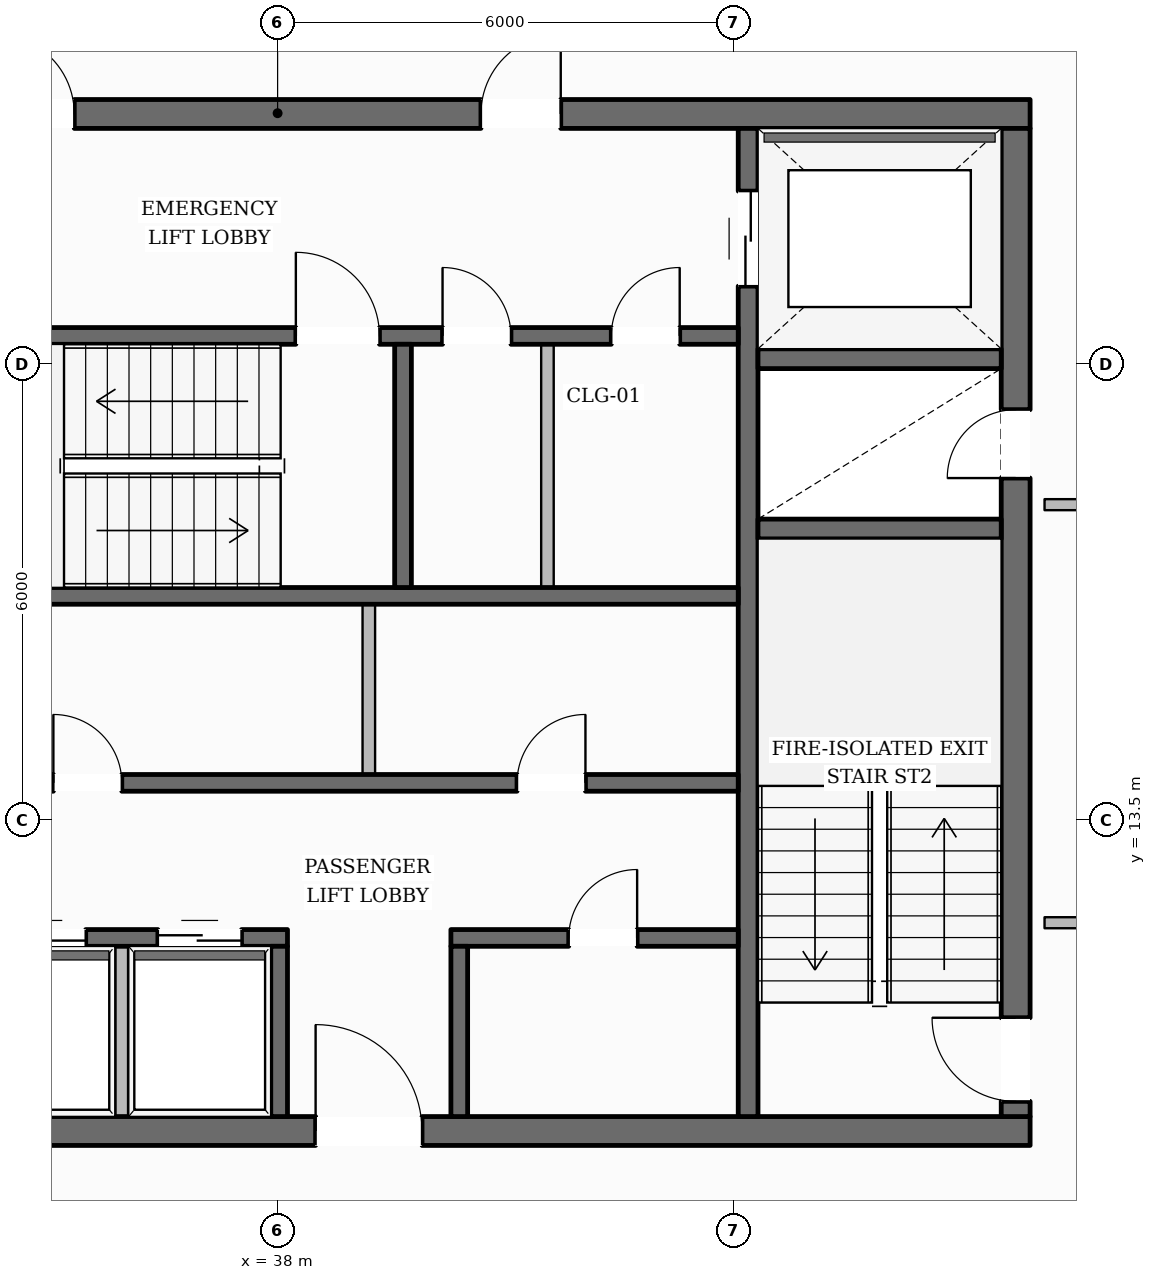
"""IFC4 building model, lengths in metres.
Left out: names, types, materials, properties, quantities, classifications, styles, units other than length and angle.
Written with IfcOpenShell. Run it as: python <this file> out.ifc"""

import sys

from ifc_helpers import new_model, si_unit, direction, frame, frame_2d, origin, place, context, subcontext, project, spatial, rectangle, extrude, element, fill, save


model = new_model("IFC4")
c1 = context("Model", 3, precision=1e-05, world=origin(), true_north=direction((0.0, 1.0)))
c2 = subcontext(c1, "Body", "Model", "MODEL_VIEW")
j1 = project(units=[si_unit("LENGTHUNIT", "METRE"), si_unit("PLANEANGLEUNIT", "RADIAN")], contexts=[c1])
p1 = place(None, origin())
s1 = spatial("IfcSite", under=j1, at=p1, CompositionType="ELEMENT")
p2 = place(p1, origin())
s2 = spatial("IfcBuilding", under=s1, at=p2, CompositionType="ELEMENT")
p3 = place(p2, frame((0.0, 0.0, 270.3)))
s3 = spatial("IfcBuildingStorey", under=s2, at=p3, CompositionType="ELEMENT", Elevation=270.3)
p4 = place(p3, frame((28.1, 9.41, 0.0), z_axis=(0.0, 0.0, 1.0), x_axis=(1.0, 0.0, 0.0)))
e1 = element("IfcWall", 1, at=p4, inside=s3, PredefinedType="SOLIDWALL", context=c2, shape_type="SweptSolid", body=[
    extrude(rectangle(XDim=19.8, YDim=0.38, at=frame_2d((9.9, 0.0))), origin(), (0.0, 0.0, 1.0), 3.61),
])
p5 = place(p4, frame((10.4, 0.0, 0.0)))
e2 = element("IfcOpeningElement", 2, at=p5, cuts=e1, PredefinedType="OPENING", context=c2, shape_type="SweptSolid", body=[
    extrude(rectangle(XDim=1.4, YDim=2.2, at=frame_2d((0.7, 1.1))), frame((0.0, 0.2, 0.0), z_axis=(0.0, -1.0, 0.0), x_axis=(1.0, 0.0, 0.0)), (0.0, 0.0, 1.0), 0.4),
])
p6 = place(p3, frame((28.1, 22.79, 0.0), z_axis=(0.0, 0.0, 1.0), x_axis=(1.0, 0.0, 0.0)))
e3 = element("IfcWall", 3, at=p6, inside=s3, PredefinedType="SOLIDWALL", context=c2, shape_type="SweptSolid", body=[
    extrude(rectangle(XDim=19.8, YDim=0.38, at=frame_2d((9.9, 0.0))), origin(), (0.0, 0.0, 1.0), 3.61),
])
p7 = place(p6, frame((6.175, 0.0, 0.0)))
e4 = element("IfcOpeningElement", 4, at=p7, cuts=e3, PredefinedType="OPENING", context=c2, shape_type="SweptSolid", body=[
    extrude(rectangle(XDim=1.05, YDim=2.15, at=frame_2d((0.525, 1.075))), frame((0.0, 0.2, 0.0), z_axis=(0.0, -1.0, 0.0), x_axis=(1.0, 0.0, 0.0)), (0.0, 0.0, 1.0), 0.4),
])
p8 = place(p6, frame((12.575, 0.0, 0.0)))
e5 = element("IfcOpeningElement", 5, at=p8, cuts=e3, PredefinedType="OPENING", context=c2, shape_type="SweptSolid", body=[
    extrude(rectangle(XDim=1.05, YDim=2.15, at=frame_2d((0.525, 1.075))), frame((0.0, 0.2, 0.0), z_axis=(0.0, -1.0, 0.0), x_axis=(1.0, 0.0, 0.0)), (0.0, 0.0, 1.0), 0.4),
])
p9 = place(p3, frame((47.71, 9.6, 0.0), z_axis=(0.0, 0.0, 1.0), x_axis=(0.0, 1.0, 0.0)))
e6 = element("IfcWall", 6, at=p9, inside=s3, PredefinedType="SOLIDWALL", context=c2, shape_type="SweptSolid", body=[
    extrude(rectangle(XDim=13.0, YDim=0.38, at=frame_2d((6.5, 0.0))), origin(), (0.0, 0.0, 1.0), 3.61),
])
p10 = place(p9, frame((0.2, 0.0, 0.0)))
e7 = element("IfcOpeningElement", 7, at=p10, cuts=e6, PredefinedType="OPENING", context=c2, shape_type="SweptSolid", body=[
    extrude(rectangle(XDim=1.1, YDim=2.15, at=frame_2d((0.55, 1.075))), frame((0.0, 0.2, 0.0), z_axis=(0.0, -1.0, 0.0), x_axis=(1.0, 0.0, 0.0)), (0.0, 0.0, 1.0), 0.4),
])
p11 = place(p9, frame((8.4, 0.0, 0.0)))
e8 = element("IfcOpeningElement", 8, at=p11, cuts=e6, PredefinedType="OPENING", context=c2, shape_type="SweptSolid", body=[
    extrude(rectangle(XDim=0.9, YDim=2.1, at=frame_2d((0.45, 1.05))), frame((0.0, 0.2, 0.0), z_axis=(0.0, -1.0, 0.0), x_axis=(1.0, 0.0, 0.0)), (0.0, 0.0, 1.0), 0.4),
])
p12 = place(p3, frame((44.19, 9.6, 0.0), z_axis=(0.0, 0.0, 1.0), x_axis=(0.0, 1.0, 0.0)))
e9 = element("IfcWall", 9, at=p12, inside=s3, PredefinedType="SHEAR", context=c2, shape_type="SweptSolid", body=[
    extrude(rectangle(XDim=13.0, YDim=0.26, at=frame_2d((6.5, 0.0))), origin(), (0.0, 0.0, 1.0), 3.61),
])
p13 = place(p12, frame((10.925, 0.0, 0.0)))
e10 = element("IfcOpeningElement", 10, at=p13, cuts=e9, PredefinedType="OPENING", context=c2, shape_type="SweptSolid", body=[
    extrude(rectangle(XDim=1.25, YDim=2.25, at=frame_2d((0.625, 1.125))), frame((0.0, 0.14, 0.0), z_axis=(0.0, -1.0, 0.0), x_axis=(1.0, 0.0, 0.0)), (0.0, 0.0, 1.0), 0.28),
])
for number, where, z_axis, x_axis in (
    (11, (44.32, 17.33, 0.0), (0.0, 0.0, 1.0), (1.0, 0.0, 0.0)),
    (12, (44.32, 19.57, 0.0), (0.0, 0.0, 1.0), (1.0, 0.0, 0.0)),
):
    element("IfcWall", number, at=place(p3, frame(where, z_axis=z_axis, x_axis=x_axis)), inside=s3, PredefinedType="SHEAR", context=c2, shape_type="SweptSolid", body=[
        extrude(rectangle(XDim=3.2, YDim=0.26, at=frame_2d((1.6, 0.0))), origin(), (0.0, 0.0, 1.0), 3.61),
    ])
p14 = place(p3, frame((31.94, 19.87, 0.0), z_axis=(0.0, 0.0, 1.0), x_axis=(1.0, 0.0, 0.0)))
e13 = element("IfcWall", 13, at=p14, inside=s3, PredefinedType="SOLIDWALL", context=c2, shape_type="SweptSolid", body=[
    extrude(rectangle(XDim=12.12, YDim=0.22, at=frame_2d((6.06, 0.0))), origin(), (0.0, 0.0, 1.0), 3.61),
])
p15 = place(p14, frame((6.3, 0.0, 0.0)))
e14 = element("IfcOpeningElement", 14, at=p15, cuts=e13, PredefinedType="OPENING", context=c2, shape_type="SweptSolid", body=[
    extrude(rectangle(XDim=1.1, YDim=2.15, at=frame_2d((0.55, 1.075))), frame((0.0, 0.12, 0.0), z_axis=(0.0, -1.0, 0.0), x_axis=(1.0, 0.0, 0.0)), (0.0, 0.0, 1.0), 0.24),
])
p16 = place(p14, frame((8.23, 0.0, 0.0)))
e15 = element("IfcOpeningElement", 15, at=p16, cuts=e13, PredefinedType="OPENING", context=c2, shape_type="SweptSolid", body=[
    extrude(rectangle(XDim=0.9, YDim=2.1, at=frame_2d((0.45, 1.05))), frame((0.0, 0.12, 0.0), z_axis=(0.0, -1.0, 0.0), x_axis=(1.0, 0.0, 0.0)), (0.0, 0.0, 1.0), 0.24),
])
p17 = place(p14, frame((10.45, 0.0, 0.0)))
e16 = element("IfcOpeningElement", 16, at=p17, cuts=e13, PredefinedType="OPENING", context=c2, shape_type="SweptSolid", body=[
    extrude(rectangle(XDim=0.9, YDim=2.1, at=frame_2d((0.45, 1.05))), frame((0.0, 0.12, 0.0), z_axis=(0.0, -1.0, 0.0), x_axis=(1.0, 0.0, 0.0)), (0.0, 0.0, 1.0), 0.24),
])
p18 = place(p3, frame((31.94, 16.45, 0.0), z_axis=(0.0, 0.0, 1.0), x_axis=(1.0, 0.0, 0.0)))
e17 = element("IfcWall", 17, at=p18, inside=s3, PredefinedType="SOLIDWALL", context=c2, shape_type="SweptSolid", body=[
    extrude(rectangle(XDim=12.12, YDim=0.22, at=frame_2d((6.06, 0.0))), origin(), (0.0, 0.0, 1.0), 3.61),
])
p19 = place(p3, frame((39.65, 16.56, 0.0), z_axis=(0.0, 0.0, 1.0), x_axis=(0.0, 1.0, 0.0)))
e18 = element("IfcWall", 18, at=p19, inside=s3, PredefinedType="SOLIDWALL", context=c2, shape_type="SweptSolid", body=[
    extrude(rectangle(XDim=3.2, YDim=0.22, at=frame_2d((1.6, 0.0))), origin(), (0.0, 0.0, 1.0), 3.61),
])
p20 = place(p3, frame((31.94, 13.99, 0.0), z_axis=(0.0, 0.0, 1.0), x_axis=(1.0, 0.0, 0.0)))
e19 = element("IfcWall", 19, at=p20, inside=s3, PredefinedType="SOLIDWALL", context=c2, shape_type="SweptSolid", body=[
    extrude(rectangle(XDim=12.12, YDim=0.22, at=frame_2d((6.06, 0.0))), origin(), (0.0, 0.0, 1.0), 3.61),
])
p21 = place(p20, frame((3.11, 0.0, 0.0)))
e20 = element("IfcOpeningElement", 20, at=p21, cuts=e19, PredefinedType="OPENING", context=c2, shape_type="SweptSolid", body=[
    extrude(rectangle(XDim=0.9, YDim=2.1, at=frame_2d((0.45, 1.05))), frame((0.0, 0.12, 0.0), z_axis=(0.0, -1.0, 0.0), x_axis=(1.0, 0.0, 0.0)), (0.0, 0.0, 1.0), 0.24),
])
p22 = place(p20, frame((9.21, 0.0, 0.0)))
e21 = element("IfcOpeningElement", 21, at=p22, cuts=e19, PredefinedType="OPENING", context=c2, shape_type="SweptSolid", body=[
    extrude(rectangle(XDim=0.9, YDim=2.1, at=frame_2d((0.45, 1.05))), frame((0.0, 0.12, 0.0), z_axis=(0.0, -1.0, 0.0), x_axis=(1.0, 0.0, 0.0)), (0.0, 0.0, 1.0), 0.24),
])
p23 = place(p3, frame((31.94, 11.95, 0.0), z_axis=(0.0, 0.0, 1.0), x_axis=(1.0, 0.0, 0.0)))
e22 = element("IfcWall", 22, at=p23, inside=s3, PredefinedType="SOLIDWALL", context=c2, shape_type="SweptSolid", body=[
    extrude(rectangle(XDim=6.19, YDim=0.22, at=frame_2d((3.095, 0.0))), origin(), (0.0, 0.0, 1.0), 3.61),
])
p24 = place(p23, frame((0.385, 0.0, 0.0)))
e23 = element("IfcOpeningElement", 23, at=p24, cuts=e22, PredefinedType="OPENING", context=c2, shape_type="SweptSolid", body=[
    extrude(rectangle(XDim=1.1, YDim=2.2, at=frame_2d((0.55, 1.1))), frame((0.0, 0.12, 0.0), z_axis=(0.0, -1.0, 0.0), x_axis=(1.0, 0.0, 0.0)), (0.0, 0.0, 1.0), 0.24),
])
p25 = place(p23, frame((2.435, 0.0, 0.0)))
e24 = element("IfcOpeningElement", 24, at=p25, cuts=e22, PredefinedType="OPENING", context=c2, shape_type="SweptSolid", body=[
    extrude(rectangle(XDim=1.1, YDim=2.2, at=frame_2d((0.55, 1.1))), frame((0.0, 0.12, 0.0), z_axis=(0.0, -1.0, 0.0), x_axis=(1.0, 0.0, 0.0)), (0.0, 0.0, 1.0), 0.24),
])
p26 = place(p23, frame((4.485, 0.0, 0.0)))
e25 = element("IfcOpeningElement", 25, at=p26, cuts=e22, PredefinedType="OPENING", context=c2, shape_type="SweptSolid", body=[
    extrude(rectangle(XDim=1.1, YDim=2.2, at=frame_2d((0.55, 1.1))), frame((0.0, 0.12, 0.0), z_axis=(0.0, -1.0, 0.0), x_axis=(1.0, 0.0, 0.0)), (0.0, 0.0, 1.0), 0.24),
])
p27 = place(p3, frame((40.28, 11.95, 0.0), z_axis=(0.0, 0.0, 1.0), x_axis=(1.0, 0.0, 0.0)))
e26 = element("IfcWall", 26, at=p27, inside=s3, PredefinedType="SOLIDWALL", context=c2, shape_type="SweptSolid", body=[
    extrude(rectangle(XDim=3.78, YDim=0.22, at=frame_2d((1.89, 0.0))), origin(), (0.0, 0.0, 1.0), 3.61),
])
p28 = place(p27, frame((1.55, 0.0, 0.0)))
e27 = element("IfcOpeningElement", 27, at=p28, cuts=e26, PredefinedType="OPENING", context=c2, shape_type="SweptSolid", body=[
    extrude(rectangle(XDim=0.9, YDim=2.1, at=frame_2d((0.45, 1.05))), frame((0.0, 0.12, 0.0), z_axis=(0.0, -1.0, 0.0), x_axis=(1.0, 0.0, 0.0)), (0.0, 0.0, 1.0), 0.24),
])
for number, where, z_axis, x_axis in (
    (28, (38.02, 9.6, 0.0), (0.0, 0.0, 1.0), (0.0, 1.0, 0.0)),
    (29, (40.39, 9.6, 0.0), (0.0, 0.0, 1.0), (0.0, 1.0, 0.0)),
):
    element("IfcWall", number, at=place(p3, frame(where, z_axis=z_axis, x_axis=x_axis)), inside=s3, PredefinedType="SOLIDWALL", context=c2, shape_type="SweptSolid", body=[
        extrude(rectangle(XDim=2.24, YDim=0.22, at=frame_2d((1.12, 0.0))), origin(), (0.0, 0.0, 1.0), 3.61),
    ])
p29 = place(p3, frame((15.686, 10.536, 0.0), z_axis=(0.0, 0.0, 1.0), x_axis=(0.506100645038, 0.862474426921, 0.0)))
e30 = element("IfcWall", 30, at=p29, inside=s3, PredefinedType="STANDARD", context=c2, shape_type="SweptSolid", body=[
    extrude(rectangle(XDim=38.084, YDim=0.35, at=frame_2d((19.042, 0.0))), origin(), (0.0, 0.0, 1.0), 3.196),
])
p30 = place(p29, frame((27.963, 0.0, 0.0)))
e31 = element("IfcOpeningElement", 31, at=p30, cuts=e30, PredefinedType="OPENING", context=c2, shape_type="SweptSolid", body=[
    extrude(rectangle(XDim=1.0, YDim=2.2, at=frame_2d((0.5, 1.1))), frame((0.0, 0.185, 0.0), z_axis=(0.0, -1.0, 0.0), x_axis=(1.0, 0.0, 0.0)), (0.0, 0.0, 1.0), 0.37),
])
p31 = place(p29, frame((33.839, 0.0, 0.65)))
e32 = element("IfcOpeningElement", 32, at=p31, cuts=e30, PredefinedType="OPENING", context=c2, shape_type="SweptSolid", body=[
    extrude(rectangle(XDim=1.35, YDim=1.75, at=frame_2d((0.675, 0.875))), frame((0.0, 0.185, 0.0), z_axis=(0.0, -1.0, 0.0), x_axis=(1.0, 0.0, 0.0)), (0.0, 0.0, 1.0), 0.37),
])
p32 = place(p29, frame((21.464, 0.0, 0.65)))
e33 = element("IfcOpeningElement", 33, at=p32, cuts=e30, PredefinedType="OPENING", context=c2, shape_type="SweptSolid", body=[
    extrude(rectangle(XDim=1.35, YDim=1.75, at=frame_2d((0.675, 0.875))), frame((0.0, 0.185, 0.0), z_axis=(0.0, -1.0, 0.0), x_axis=(1.0, 0.0, 0.0)), (0.0, 0.0, 1.0), 0.37),
])
p33 = place(p29, frame((9.089, 0.0, 0.65)))
e34 = element("IfcOpeningElement", 34, at=p33, cuts=e30, PredefinedType="OPENING", context=c2, shape_type="SweptSolid", body=[
    extrude(rectangle(XDim=1.35, YDim=1.75, at=frame_2d((0.675, 0.875))), frame((0.0, 0.185, 0.0), z_axis=(0.0, -1.0, 0.0), x_axis=(1.0, 0.0, 0.0)), (0.0, 0.0, 1.0), 0.37),
])
p34 = place(p29, frame((2.902, 0.0, 0.65)))
e35 = element("IfcOpeningElement", 35, at=p34, cuts=e30, PredefinedType="OPENING", context=c2, shape_type="SweptSolid", body=[
    extrude(rectangle(XDim=1.35, YDim=1.75, at=frame_2d((0.675, 0.875))), frame((0.0, 0.185, 0.0), z_axis=(0.0, -1.0, 0.0), x_axis=(1.0, 0.0, 0.0)), (0.0, 0.0, 1.0), 0.37),
])
p35 = place(p3, frame((41.09, 43.352, 0.0), z_axis=(0.0, 0.0, 1.0), x_axis=(0.509850521087, -0.860263009868, 0.0)))
e36 = element("IfcWall", 36, at=p35, inside=s3, PredefinedType="STANDARD", context=c2, shape_type="SweptSolid", body=[
    extrude(rectangle(XDim=38.375, YDim=0.35, at=frame_2d((19.188, 0.0))), origin(), (0.0, 0.0, 1.0), 3.196),
])
p36 = place(p35, frame((28.181, 0.0, 0.0)))
e37 = element("IfcOpeningElement", 37, at=p36, cuts=e36, PredefinedType="OPENING", context=c2, shape_type="SweptSolid", body=[
    extrude(rectangle(XDim=1.0, YDim=2.2, at=frame_2d((0.5, 1.1))), frame((0.0, 0.185, 0.0), z_axis=(0.0, -1.0, 0.0), x_axis=(1.0, 0.0, 0.0)), (0.0, 0.0, 1.0), 0.37),
])
p37 = place(p35, frame((34.098, 0.0, 0.65)))
e38 = element("IfcOpeningElement", 38, at=p37, cuts=e36, PredefinedType="OPENING", context=c2, shape_type="SweptSolid", body=[
    extrude(rectangle(XDim=1.35, YDim=1.75, at=frame_2d((0.675, 0.875))), frame((0.0, 0.185, 0.0), z_axis=(0.0, -1.0, 0.0), x_axis=(1.0, 0.0, 0.0)), (0.0, 0.0, 1.0), 0.37),
])
p38 = place(p35, frame((21.625, 0.0, 0.65)))
e39 = element("IfcOpeningElement", 39, at=p38, cuts=e36, PredefinedType="OPENING", context=c2, shape_type="SweptSolid", body=[
    extrude(rectangle(XDim=1.35, YDim=1.75, at=frame_2d((0.675, 0.875))), frame((0.0, 0.185, 0.0), z_axis=(0.0, -1.0, 0.0), x_axis=(1.0, 0.0, 0.0)), (0.0, 0.0, 1.0), 0.37),
])
p39 = place(p35, frame((9.152, 0.0, 0.65)))
e40 = element("IfcOpeningElement", 40, at=p39, cuts=e36, PredefinedType="OPENING", context=c2, shape_type="SweptSolid", body=[
    extrude(rectangle(XDim=1.35, YDim=1.75, at=frame_2d((0.675, 0.875))), frame((0.0, 0.185, 0.0), z_axis=(0.0, -1.0, 0.0), x_axis=(1.0, 0.0, 0.0)), (0.0, 0.0, 1.0), 0.37),
])
p40 = place(p35, frame((2.915, 0.0, 0.65)))
e41 = element("IfcOpeningElement", 41, at=p40, cuts=e36, PredefinedType="OPENING", context=c2, shape_type="SweptSolid", body=[
    extrude(rectangle(XDim=1.35, YDim=1.75, at=frame_2d((0.675, 0.875))), frame((0.0, 0.185, 0.0), z_axis=(0.0, -1.0, 0.0), x_axis=(1.0, 0.0, 0.0)), (0.0, 0.0, 1.0), 0.37),
])
p41 = place(p3, frame((35.95, 9.49, 0.0), z_axis=(0.0, 0.0, 1.0), x_axis=(0.0, 1.0, 0.0)))
e42 = element("IfcWall", 42, at=p41, inside=s3, PredefinedType="PARTITIONING", context=c2, shape_type="SweptSolid", body=[
    extrude(rectangle(XDim=2.35, YDim=0.165, at=frame_2d((1.175, 0.0))), origin(), (0.0, 0.0, 1.0), 3.61),
])
p42 = place(p3, frame((39.2, 14.1, 0.0), z_axis=(0.0, 0.0, 1.0), x_axis=(0.0, 1.0, 0.0)))
e43 = element("IfcWall", 43, at=p42, inside=s3, PredefinedType="PARTITIONING", context=c2, shape_type="SweptSolid", body=[
    extrude(rectangle(XDim=2.24, YDim=0.165, at=frame_2d((1.12, 0.0))), origin(), (0.0, 0.0, 1.0), 3.61),
])
p43 = place(p3, frame((41.55, 16.56, 0.0), z_axis=(0.0, 0.0, 1.0), x_axis=(0.0, 1.0, 0.0)))
e44 = element("IfcWall", 44, at=p43, inside=s3, PredefinedType="PARTITIONING", context=c2, shape_type="SweptSolid", body=[
    extrude(rectangle(XDim=3.2, YDim=0.165, at=frame_2d((1.6, 0.0))), origin(), (0.0, 0.0, 1.0), 3.61),
])
for number, where, z_axis, x_axis in (
    (45, (49.91, 17.65, 0.0), (0.0, 0.0, 1.0), (-1.0, 0.0, 0.0)),
    (46, (48.09, 12.15, 0.0), (0.0, 0.0, 1.0), (1.0, 0.0, 0.0)),
):
    element("IfcWall", number, at=place(p3, frame(where, z_axis=z_axis, x_axis=x_axis)), inside=s3, PredefinedType="PARTITIONING", context=c2, shape_type="SweptSolid", body=[
        extrude(rectangle(XDim=1.82, YDim=0.145, at=frame_2d((0.91, 0.0))), origin(), (0.0, 0.0, 1.0), 3.61),
    ])
p44 = place(p10, origin())
e47 = element("IfcDoor", 47, at=p44, inside=s3, OperationType="SINGLE_SWING_RIGHT", PredefinedType="DOOR", context=c2, shape_type="SweptSolid", body=[
    extrude(rectangle(XDim=1.1, YDim=2.15, at=frame_2d((0.55, 1.075))), frame((0.0, 0.025, 0.0), z_axis=(0.0, -1.0, 0.0), x_axis=(1.0, 0.0, 0.0)), (0.0, 0.0, 1.0), 0.05),
])
fill(e7, e47)
p45 = place(p15, origin())
e48 = element("IfcDoor", 48, at=p45, inside=s3, OperationType="SINGLE_SWING_LEFT", PredefinedType="DOOR", context=c2, shape_type="SweptSolid", body=[
    extrude(rectangle(XDim=1.1, YDim=2.15, at=frame_2d((0.55, 1.075))), frame((0.0, 0.025, 0.0), z_axis=(0.0, -1.0, 0.0), x_axis=(1.0, 0.0, 0.0)), (0.0, 0.0, 1.0), 0.05),
])
fill(e14, e48)
p46 = place(p11, origin())
e49 = element("IfcDoor", 49, at=p46, inside=s3, OperationType="SINGLE_SWING_LEFT", PredefinedType="DOOR", context=c2, shape_type="SweptSolid", body=[
    extrude(rectangle(XDim=0.9, YDim=2.1, at=frame_2d((0.45, 1.05))), frame((0.0, 0.025, 0.0), z_axis=(0.0, -1.0, 0.0), x_axis=(1.0, 0.0, 0.0)), (0.0, 0.0, 1.0), 0.05),
])
fill(e8, e49)
p47 = place(p7, origin())
e50 = element("IfcDoor", 50, at=p47, inside=s3, OperationType="SINGLE_SWING_LEFT", PredefinedType="DOOR", context=c2, shape_type="SweptSolid", body=[
    extrude(rectangle(XDim=1.05, YDim=2.15, at=frame_2d((0.525, 1.075))), frame((0.0, 0.025, 0.0), z_axis=(0.0, -1.0, 0.0), x_axis=(1.0, 0.0, 0.0)), (0.0, 0.0, 1.0), 0.05),
])
fill(e4, e50)
p48 = place(p8, origin())
e51 = element("IfcDoor", 51, at=p48, inside=s3, OperationType="SINGLE_SWING_RIGHT", PredefinedType="DOOR", context=c2, shape_type="SweptSolid", body=[
    extrude(rectangle(XDim=1.05, YDim=2.15, at=frame_2d((0.525, 1.075))), frame((0.0, 0.025, 0.0), z_axis=(0.0, -1.0, 0.0), x_axis=(1.0, 0.0, 0.0)), (0.0, 0.0, 1.0), 0.05),
])
fill(e5, e51)
p49 = place(p13, origin())
e52 = element("IfcDoor", 52, at=p49, inside=s3, OperationType="DOUBLE_DOOR_SLIDING", PredefinedType="DOOR", context=c2, shape_type="SweptSolid", body=[
    extrude(rectangle(XDim=1.25, YDim=2.25, at=frame_2d((0.625, 1.125))), frame((0.0, 0.025, 0.0), z_axis=(0.0, -1.0, 0.0), x_axis=(1.0, 0.0, 0.0)), (0.0, 0.0, 1.0), 0.05),
])
fill(e10, e52)
p50 = place(p5, origin())
e53 = element("IfcDoor", 53, at=p50, inside=s3, OperationType="SINGLE_SWING_LEFT", PredefinedType="DOOR", context=c2, shape_type="SweptSolid", body=[
    extrude(rectangle(XDim=1.4, YDim=2.2, at=frame_2d((0.7, 1.1))), frame((0.0, 0.025, 0.0), z_axis=(0.0, -1.0, 0.0), x_axis=(1.0, 0.0, 0.0)), (0.0, 0.0, 1.0), 0.05),
])
fill(e2, e53)
p51 = place(p25, origin())
e54 = element("IfcDoor", 54, at=p51, inside=s3, OperationType="DOUBLE_DOOR_SLIDING", PredefinedType="DOOR", context=c2, shape_type="SweptSolid", body=[
    extrude(rectangle(XDim=1.1, YDim=2.2, at=frame_2d((0.55, 1.1))), frame((0.0, 0.025, 0.0), z_axis=(0.0, -1.0, 0.0), x_axis=(1.0, 0.0, 0.0)), (0.0, 0.0, 1.0), 0.05),
])
fill(e24, e54)
p52 = place(p26, origin())
e55 = element("IfcDoor", 55, at=p52, inside=s3, OperationType="DOUBLE_DOOR_SLIDING", PredefinedType="DOOR", context=c2, shape_type="SweptSolid", body=[
    extrude(rectangle(XDim=1.1, YDim=2.2, at=frame_2d((0.55, 1.1))), frame((0.0, 0.025, 0.0), z_axis=(0.0, -1.0, 0.0), x_axis=(1.0, 0.0, 0.0)), (0.0, 0.0, 1.0), 0.05),
])
fill(e25, e55)
p53 = place(p21, origin())
e56 = element("IfcDoor", 56, at=p53, inside=s3, OperationType="SINGLE_SWING_LEFT", PredefinedType="DOOR", context=c2, shape_type="SweptSolid", body=[
    extrude(rectangle(XDim=0.9, YDim=2.1, at=frame_2d((0.45, 1.05))), frame((0.0, 0.025, 0.0), z_axis=(0.0, -1.0, 0.0), x_axis=(1.0, 0.0, 0.0)), (0.0, 0.0, 1.0), 0.05),
])
fill(e20, e56)
p54 = place(p22, origin())
e57 = element("IfcDoor", 57, at=p54, inside=s3, OperationType="SINGLE_SWING_RIGHT", PredefinedType="DOOR", context=c2, shape_type="SweptSolid", body=[
    extrude(rectangle(XDim=0.9, YDim=2.1, at=frame_2d((0.45, 1.05))), frame((0.0, 0.025, 0.0), z_axis=(0.0, -1.0, 0.0), x_axis=(1.0, 0.0, 0.0)), (0.0, 0.0, 1.0), 0.05),
])
fill(e21, e57)
p55 = place(p16, origin())
e58 = element("IfcDoor", 58, at=p55, inside=s3, OperationType="SINGLE_SWING_LEFT", PredefinedType="DOOR", context=c2, shape_type="SweptSolid", body=[
    extrude(rectangle(XDim=0.9, YDim=2.1, at=frame_2d((0.45, 1.05))), frame((0.0, 0.025, 0.0), z_axis=(0.0, -1.0, 0.0), x_axis=(1.0, 0.0, 0.0)), (0.0, 0.0, 1.0), 0.05),
])
fill(e15, e58)
p56 = place(p17, origin())
e59 = element("IfcDoor", 59, at=p56, inside=s3, OperationType="SINGLE_SWING_RIGHT", PredefinedType="DOOR", context=c2, shape_type="SweptSolid", body=[
    extrude(rectangle(XDim=0.9, YDim=2.1, at=frame_2d((0.45, 1.05))), frame((0.0, 0.025, 0.0), z_axis=(0.0, -1.0, 0.0), x_axis=(1.0, 0.0, 0.0)), (0.0, 0.0, 1.0), 0.05),
])
fill(e16, e59)
p57 = place(p28, origin())
e60 = element("IfcDoor", 60, at=p57, inside=s3, OperationType="SINGLE_SWING_RIGHT", PredefinedType="DOOR", context=c2, shape_type="SweptSolid", body=[
    extrude(rectangle(XDim=0.9, YDim=2.1, at=frame_2d((0.45, 1.05))), frame((0.0, 0.025, 0.0), z_axis=(0.0, -1.0, 0.0), x_axis=(1.0, 0.0, 0.0)), (0.0, 0.0, 1.0), 0.05),
])
fill(e27, e60)
save(model, sys.argv[1])
